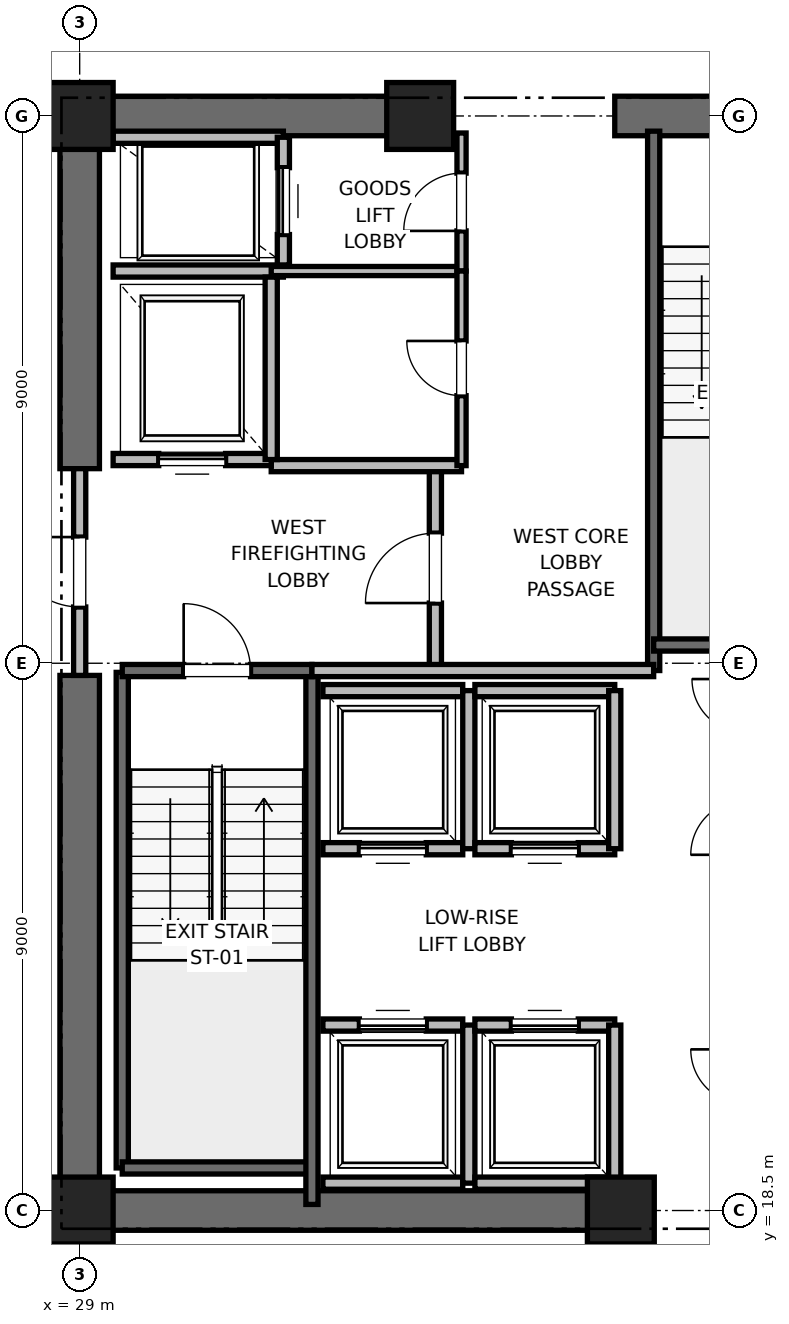
"""IFC4 building model, lengths in metres.
Left out: names, types, materials, properties, quantities, classifications, styles, units other than length and angle.
Written with IfcOpenShell. Run it as: python <this file> out.ifc"""

import sys

from ifc_helpers import new_model, si_unit, direction, frame, frame_2d, origin, origin_2d, place, context, subcontext, project, spatial, rectangle, extrude, element, fill, save


model = new_model("IFC4")
c1 = context("Model", 3, precision=1e-05, world=origin(), true_north=direction((0.0, 1.0)))
c2 = subcontext(c1, "Body", "Model", "MODEL_VIEW")
j1 = project(units=[si_unit("LENGTHUNIT", "METRE"), si_unit("PLANEANGLEUNIT", "RADIAN")], contexts=[c1])
p1 = place(None, origin())
s1 = spatial("IfcSite", under=j1, at=p1, CompositionType="ELEMENT")
p2 = place(p1, origin())
s2 = spatial("IfcBuilding", under=s1, at=p2, CompositionType="ELEMENT")
p3 = place(p2, frame((0.0, 0.0, 95.6)))
s3 = spatial("IfcBuildingStorey", under=s2, at=p3, CompositionType="ELEMENT", Elevation=95.6)
for number, where, z_axis, x_axis in (
    (1, (29.0, 18.5, 0.0), (0.0, 0.0, 1.0), (1.0, 0.0, 0.0)),
    (2, (29.0, 36.5, 0.0), (0.0, 0.0, 1.0), (1.0, 0.0, 0.0)),
    (3, (37.9, 18.5, 0.0), (0.0, 0.0, 1.0), (1.0, 0.0, 0.0)),
    (4, (34.6, 36.5, 0.0), (0.0, 0.0, 1.0), (1.0, 0.0, 0.0)),
):
    element("IfcColumn", number, at=place(p3, frame(where, z_axis=z_axis, x_axis=x_axis)), inside=s3, PredefinedType="PILASTER", context=c2, shape_type="SweptSolid", body=[
        extrude(rectangle(XDim=1.1, YDim=1.1, at=origin_2d()), origin(), (0.0, 0.0, 1.0), 4.0),
    ])
p4 = place(p3, frame((29.0, 18.5, 0.0), z_axis=(0.0, 0.0, 1.0), x_axis=(1.0, 0.0, 0.0)))
e5 = element("IfcWall", 5, at=p4, inside=s3, PredefinedType="SHEAR", context=c2, shape_type="SweptSolid", body=[
    extrude(rectangle(XDim=9.2, YDim=0.65, at=frame_2d((4.6, 0.0))), origin(), (0.0, 0.0, 1.0), 3.76),
])
p5 = place(p3, frame((29.0, 36.5, 0.0), z_axis=(0.0, 0.0, 1.0), x_axis=(1.0, 0.0, 0.0)))
e6 = element("IfcWall", 6, at=p5, inside=s3, PredefinedType="SHEAR", context=c2, shape_type="SweptSolid", body=[
    extrude(rectangle(XDim=5.8, YDim=0.65, at=frame_2d((2.9, 0.0))), origin(), (0.0, 0.0, 1.0), 3.76),
])
p6 = place(p3, frame((37.8, 36.5, 0.0), z_axis=(0.0, 0.0, 1.0), x_axis=(1.0, 0.0, 0.0)))
e7 = element("IfcWall", 7, at=p6, inside=s3, PredefinedType="SHEAR", context=c2, shape_type="SweptSolid", body=[
    extrude(rectangle(XDim=4.4, YDim=0.65, at=frame_2d((2.2, 0.0))), origin(), (0.0, 0.0, 1.0), 3.76),
])
p7 = place(p6, frame((1.65, 0.0, 0.0)))
e8 = element("IfcOpeningElement", 8, at=p7, cuts=e7, PredefinedType="OPENING", context=c2, shape_type="SweptSolid", body=[
    extrude(rectangle(XDim=1.1, YDim=2.15, at=frame_2d((0.55, 1.075))), frame((0.0, 0.325, 0.0), z_axis=(0.0, -1.0, 0.0), x_axis=(1.0, 0.0, 0.0)), (0.0, 0.0, 1.0), 0.65),
])
p8 = place(p3, frame((29.0, 18.5, 0.0), z_axis=(0.0, 0.0, 1.0), x_axis=(0.0, 1.0, 0.0)))
e9 = element("IfcWall", 9, at=p8, inside=s3, PredefinedType="SHEAR", context=c2, shape_type="SweptSolid", body=[
    extrude(rectangle(XDim=8.8, YDim=0.65, at=frame_2d((4.4, 0.0))), origin(), (0.0, 0.0, 1.0), 3.76),
])
p9 = place(p3, frame((29.0, 30.7, 0.0), z_axis=(0.0, 0.0, 1.0), x_axis=(0.0, 1.0, 0.0)))
e10 = element("IfcWall", 10, at=p9, inside=s3, PredefinedType="SHEAR", context=c2, shape_type="SweptSolid", body=[
    extrude(rectangle(XDim=5.8, YDim=0.65, at=frame_2d((2.9, 0.0))), origin(), (0.0, 0.0, 1.0), 3.76),
])
p10 = place(p3, frame((29.7, 19.2, 0.0), z_axis=(0.0, 0.0, 1.0), x_axis=(0.0, 1.0, 0.0)))
e11 = element("IfcWall", 11, at=p10, inside=s3, PredefinedType="SOLIDWALL", context=c2, shape_type="SweptSolid", body=[
    extrude(rectangle(XDim=8.15, YDim=0.2, at=frame_2d((4.075, 0.0))), origin(), (0.0, 0.0, 1.0), 3.76),
])
p11 = place(p3, frame((29.7, 19.2, 0.0), z_axis=(0.0, 0.0, 1.0), x_axis=(1.0, 0.0, 0.0)))
e12 = element("IfcWall", 12, at=p11, inside=s3, PredefinedType="SOLIDWALL", context=c2, shape_type="SweptSolid", body=[
    extrude(rectangle(XDim=3.12, YDim=0.2, at=frame_2d((1.56, 0.0))), origin(), (0.0, 0.0, 1.0), 3.76),
])
p12 = place(p3, frame((32.82, 18.6, 0.0), z_axis=(0.0, 0.0, 1.0), x_axis=(0.0, 1.0, 0.0)))
e13 = element("IfcWall", 13, at=p12, inside=s3, PredefinedType="SOLIDWALL", context=c2, shape_type="SweptSolid", body=[
    extrude(rectangle(XDim=8.78, YDim=0.2, at=frame_2d((4.39, 0.0))), origin(), (0.0, 0.0, 1.0), 3.76),
])
p13 = place(p3, frame((29.7, 27.38, 0.0), z_axis=(0.0, 0.0, 1.0), x_axis=(1.0, 0.0, 0.0)))
e14 = element("IfcWall", 14, at=p13, inside=s3, PredefinedType="SOLIDWALL", context=c2, shape_type="SweptSolid", body=[
    extrude(rectangle(XDim=3.12, YDim=0.2, at=frame_2d((1.56, 0.0))), origin(), (0.0, 0.0, 1.0), 3.76),
])
p14 = place(p13, frame((1.01, 0.0, 0.0)))
e15 = element("IfcOpeningElement", 15, at=p14, cuts=e14, PredefinedType="OPENING", context=c2, shape_type="SweptSolid", body=[
    extrude(rectangle(XDim=1.1, YDim=2.15, at=frame_2d((0.55, 1.075))), frame((0.0, 0.1, 0.0), z_axis=(0.0, -1.0, 0.0), x_axis=(1.0, 0.0, 0.0)), (0.0, 0.0, 1.0), 0.2),
])
p15 = place(p3, frame((38.44, 27.38, 0.0), z_axis=(0.0, 0.0, 1.0), x_axis=(0.0, 1.0, 0.0)))
e16 = element("IfcWall", 16, at=p15, inside=s3, PredefinedType="SOLIDWALL", context=c2, shape_type="SweptSolid", body=[
    extrude(rectangle(XDim=8.87, YDim=0.2, at=frame_2d((4.435, 0.0))), origin(), (0.0, 0.0, 1.0), 3.76),
])
p16 = place(p3, frame((38.44, 27.8, 0.0), z_axis=(0.0, 0.0, 1.0), x_axis=(1.0, 0.0, 0.0)))
e17 = element("IfcWall", 17, at=p16, inside=s3, PredefinedType="SOLIDWALL", context=c2, shape_type="SweptSolid", body=[
    extrude(rectangle(XDim=3.32, YDim=0.2, at=frame_2d((1.66, 0.0))), origin(), (0.0, 0.0, 1.0), 3.76),
])
p17 = place(p3, frame((34.85, 27.38, 0.0), z_axis=(0.0, 0.0, 1.0), x_axis=(0.0, 1.0, 0.0)))
e18 = element("IfcWall", 18, at=p17, inside=s3, PredefinedType="PARTITIONING", context=c2, shape_type="SweptSolid", body=[
    extrude(rectangle(XDim=3.37, YDim=0.2, at=frame_2d((1.685, 0.0))), origin(), (0.0, 0.0, 1.0), 3.76),
])
p18 = place(p17, frame((1.11, 0.0, 0.0)))
e19 = element("IfcOpeningElement", 19, at=p18, cuts=e18, PredefinedType="OPENING", context=c2, shape_type="SweptSolid", body=[
    extrude(rectangle(XDim=1.15, YDim=2.2, at=frame_2d((0.575, 1.1))), frame((0.0, 0.1, 0.0), z_axis=(0.0, -1.0, 0.0), x_axis=(1.0, 0.0, 0.0)), (0.0, 0.0, 1.0), 0.2),
])
p19 = place(p3, frame((29.0, 27.3, 0.0), z_axis=(0.0, 0.0, 1.0), x_axis=(0.0, 1.0, 0.0)))
e20 = element("IfcWall", 20, at=p19, inside=s3, PredefinedType="PARTITIONING", context=c2, shape_type="SweptSolid", body=[
    extrude(rectangle(XDim=3.4, YDim=0.2, at=frame_2d((1.7, 0.0))), origin(), (0.0, 0.0, 1.0), 2.54),
])
p20 = place(p19, frame((1.125, 0.0, 0.0)))
e21 = element("IfcOpeningElement", 21, at=p20, cuts=e20, PredefinedType="OPENING", context=c2, shape_type="SweptSolid", body=[
    extrude(rectangle(XDim=1.15, YDim=2.2, at=frame_2d((0.575, 1.1))), frame((0.0, 0.1, 0.0), z_axis=(0.0, -1.0, 0.0), x_axis=(1.0, 0.0, 0.0)), (0.0, 0.0, 1.0), 0.2),
])
p21 = place(p3, frame((32.82, 27.38, 0.0), z_axis=(0.0, 0.0, 1.0), x_axis=(1.0, 0.0, 0.0)))
e22 = element("IfcWall", 22, at=p21, inside=s3, PredefinedType="PARTITIONING", context=c2, shape_type="SweptSolid", body=[
    extrude(rectangle(XDim=5.62, YDim=0.2, at=frame_2d((2.81, 0.0))), origin(), (0.0, 0.0, 1.0), 3.76),
])
p22 = place(p3, frame((32.15, 30.75, 0.0), z_axis=(0.0, 0.0, 1.0), x_axis=(1.0, 0.0, 0.0)))
e23 = element("IfcWall", 23, at=p22, inside=s3, PredefinedType="PARTITIONING", context=c2, shape_type="SweptSolid", body=[
    extrude(rectangle(XDim=3.13, YDim=0.2, at=frame_2d((1.565, 0.0))), origin(), (0.0, 0.0, 1.0), 3.76),
])
p23 = place(p3, frame((29.55, 30.85, 0.0), z_axis=(0.0, 0.0, 1.0), x_axis=(1.0, 0.0, 0.0)))
e24 = element("IfcWall", 24, at=p23, inside=s3, PredefinedType="SOLIDWALL", context=c2, shape_type="SweptSolid", body=[
    extrude(rectangle(XDim=2.6, YDim=0.2, at=frame_2d((1.3, 0.0))), origin(), (0.0, 0.0, 1.0), 2.54),
])
p24 = place(p23, frame((0.75, 0.0, 0.0)))
e25 = element("IfcOpeningElement", 25, at=p24, cuts=e24, PredefinedType="OPENING", context=c2, shape_type="SweptSolid", body=[
    extrude(rectangle(XDim=1.1, YDim=2.2, at=frame_2d((0.55, 1.1))), frame((0.0, 0.1, 0.0), z_axis=(0.0, -1.0, 0.0), x_axis=(1.0, 0.0, 0.0)), (0.0, 0.0, 1.0), 0.2),
])
p25 = place(p3, frame((29.55, 33.95, 0.0), z_axis=(0.0, 0.0, 1.0), x_axis=(1.0, 0.0, 0.0)))
e26 = element("IfcWall", 26, at=p25, inside=s3, PredefinedType="SOLIDWALL", context=c2, shape_type="SweptSolid", body=[
    extrude(rectangle(XDim=2.8, YDim=0.2, at=frame_2d((1.4, 0.0))), origin(), (0.0, 0.0, 1.0), 3.76),
])
p26 = place(p3, frame((32.15, 30.85, 0.0), z_axis=(0.0, 0.0, 1.0), x_axis=(0.0, 1.0, 0.0)))
e27 = element("IfcWall", 27, at=p26, inside=s3, PredefinedType="SOLIDWALL", context=c2, shape_type="SweptSolid", body=[
    extrude(rectangle(XDim=3.0, YDim=0.2, at=frame_2d((1.5, 0.0))), origin(), (0.0, 0.0, 1.0), 3.76),
])
p27 = place(p3, frame((32.35, 36.15, 0.0), z_axis=(0.0, 0.0, 1.0), x_axis=(-1.0, 0.0, 0.0)))
e28 = element("IfcWall", 28, at=p27, inside=s3, PredefinedType="SOLIDWALL", context=c2, shape_type="SweptSolid", body=[
    extrude(rectangle(XDim=2.8, YDim=0.2, at=frame_2d((1.4, 0.0))), origin(), (0.0, 0.0, 1.0), 2.889),
])
p28 = place(p3, frame((32.35, 34.05, 0.0), z_axis=(0.0, 0.0, 1.0), x_axis=(0.0, 1.0, 0.0)))
e29 = element("IfcWall", 29, at=p28, inside=s3, PredefinedType="SOLIDWALL", context=c2, shape_type="SweptSolid", body=[
    extrude(rectangle(XDim=2.1, YDim=0.2, at=frame_2d((1.05, 0.0))), origin(), (0.0, 0.0, 1.0), 3.76),
])
p29 = place(p28, frame((0.5, 0.0, 0.0)))
e30 = element("IfcOpeningElement", 30, at=p29, cuts=e29, PredefinedType="OPENING", context=c2, shape_type="SweptSolid", body=[
    extrude(rectangle(XDim=1.1, YDim=2.2, at=frame_2d((0.55, 1.1))), frame((0.0, 0.1, 0.0), z_axis=(0.0, -1.0, 0.0), x_axis=(1.0, 0.0, 0.0)), (0.0, 0.0, 1.0), 0.2),
])
p30 = place(p3, frame((33.0, 18.95, 0.0), z_axis=(0.0, 0.0, 1.0), x_axis=(1.0, 0.0, 0.0)))
e31 = element("IfcWall", 31, at=p30, inside=s3, PredefinedType="SOLIDWALL", context=c2, shape_type="SweptSolid", body=[
    extrude(rectangle(XDim=2.3, YDim=0.2, at=frame_2d((1.15, 0.0))), origin(), (0.0, 0.0, 1.0), 3.76),
])
p31 = place(p3, frame((35.3, 21.55, 0.0), z_axis=(0.0, 0.0, 1.0), x_axis=(-1.0, 0.0, 0.0)))
e32 = element("IfcWall", 32, at=p31, inside=s3, PredefinedType="SOLIDWALL", context=c2, shape_type="SweptSolid", body=[
    extrude(rectangle(XDim=2.3, YDim=0.2, at=frame_2d((1.15, 0.0))), origin(), (0.0, 0.0, 1.0), 3.76),
])
p32 = place(p31, frame((0.6, 0.0, 0.0)))
e33 = element("IfcOpeningElement", 33, at=p32, cuts=e32, PredefinedType="OPENING", context=c2, shape_type="SweptSolid", body=[
    extrude(rectangle(XDim=1.1, YDim=2.2, at=frame_2d((0.55, 1.1))), frame((0.0, 0.1, 0.0), z_axis=(0.0, -1.0, 0.0), x_axis=(1.0, 0.0, 0.0)), (0.0, 0.0, 1.0), 0.2),
])
p33 = place(p3, frame((35.4, 18.95, 0.0), z_axis=(0.0, 0.0, 1.0), x_axis=(0.0, 1.0, 0.0)))
e34 = element("IfcWall", 34, at=p33, inside=s3, PredefinedType="SOLIDWALL", context=c2, shape_type="SweptSolid", body=[
    extrude(rectangle(XDim=2.6, YDim=0.2, at=frame_2d((1.3, 0.0))), origin(), (0.0, 0.0, 1.0), 3.76),
])
p34 = place(p3, frame((35.5, 18.95, 0.0), z_axis=(0.0, 0.0, 1.0), x_axis=(1.0, 0.0, 0.0)))
e35 = element("IfcWall", 35, at=p34, inside=s3, PredefinedType="SOLIDWALL", context=c2, shape_type="SweptSolid", body=[
    extrude(rectangle(XDim=2.3, YDim=0.2, at=frame_2d((1.15, 0.0))), origin(), (0.0, 0.0, 1.0), 2.54),
])
p35 = place(p3, frame((37.8, 21.55, 0.0), z_axis=(0.0, 0.0, 1.0), x_axis=(-1.0, 0.0, 0.0)))
e36 = element("IfcWall", 36, at=p35, inside=s3, PredefinedType="SOLIDWALL", context=c2, shape_type="SweptSolid", body=[
    extrude(rectangle(XDim=2.3, YDim=0.2, at=frame_2d((1.15, 0.0))), origin(), (0.0, 0.0, 1.0), 3.76),
])
p36 = place(p35, frame((0.6, 0.0, 0.0)))
e37 = element("IfcOpeningElement", 37, at=p36, cuts=e36, PredefinedType="OPENING", context=c2, shape_type="SweptSolid", body=[
    extrude(rectangle(XDim=1.1, YDim=2.2, at=frame_2d((0.55, 1.1))), frame((0.0, 0.1, 0.0), z_axis=(0.0, -1.0, 0.0), x_axis=(1.0, 0.0, 0.0)), (0.0, 0.0, 1.0), 0.2),
])
p37 = place(p3, frame((37.8, 18.95, 0.0), z_axis=(0.0, 0.0, 1.0), x_axis=(0.0, 1.0, 0.0)))
e38 = element("IfcWall", 38, at=p37, inside=s3, PredefinedType="SOLIDWALL", context=c2, shape_type="SweptSolid", body=[
    extrude(rectangle(XDim=2.6, YDim=0.2, at=frame_2d((1.3, 0.0))), origin(), (0.0, 0.0, 1.0), 2.54),
])
p38 = place(p3, frame((33.0, 24.45, 0.0), z_axis=(0.0, 0.0, 1.0), x_axis=(1.0, 0.0, 0.0)))
e39 = element("IfcWall", 39, at=p38, inside=s3, PredefinedType="SOLIDWALL", context=c2, shape_type="SweptSolid", body=[
    extrude(rectangle(XDim=2.3, YDim=0.2, at=frame_2d((1.15, 0.0))), origin(), (0.0, 0.0, 1.0), 3.76),
])
p39 = place(p38, frame((0.6, 0.0, 0.0)))
e40 = element("IfcOpeningElement", 40, at=p39, cuts=e39, PredefinedType="OPENING", context=c2, shape_type="SweptSolid", body=[
    extrude(rectangle(XDim=1.1, YDim=2.2, at=frame_2d((0.55, 1.1))), frame((0.0, 0.1, 0.0), z_axis=(0.0, -1.0, 0.0), x_axis=(1.0, 0.0, 0.0)), (0.0, 0.0, 1.0), 0.2),
])
p40 = place(p3, frame((35.3, 27.05, 0.0), z_axis=(0.0, 0.0, 1.0), x_axis=(-1.0, 0.0, 0.0)))
e41 = element("IfcWall", 41, at=p40, inside=s3, PredefinedType="SOLIDWALL", context=c2, shape_type="SweptSolid", body=[
    extrude(rectangle(XDim=2.3, YDim=0.2, at=frame_2d((1.15, 0.0))), origin(), (0.0, 0.0, 1.0), 3.76),
])
p41 = place(p3, frame((35.4, 24.45, 0.0), z_axis=(0.0, 0.0, 1.0), x_axis=(0.0, 1.0, 0.0)))
e42 = element("IfcWall", 42, at=p41, inside=s3, PredefinedType="SOLIDWALL", context=c2, shape_type="SweptSolid", body=[
    extrude(rectangle(XDim=2.6, YDim=0.2, at=frame_2d((1.3, 0.0))), origin(), (0.0, 0.0, 1.0), 3.76),
])
p42 = place(p3, frame((35.5, 24.45, 0.0), z_axis=(0.0, 0.0, 1.0), x_axis=(1.0, 0.0, 0.0)))
e43 = element("IfcWall", 43, at=p42, inside=s3, PredefinedType="SOLIDWALL", context=c2, shape_type="SweptSolid", body=[
    extrude(rectangle(XDim=2.3, YDim=0.2, at=frame_2d((1.15, 0.0))), origin(), (0.0, 0.0, 1.0), 3.76),
])
p43 = place(p42, frame((0.6, 0.0, 0.0)))
e44 = element("IfcOpeningElement", 44, at=p43, cuts=e43, PredefinedType="OPENING", context=c2, shape_type="SweptSolid", body=[
    extrude(rectangle(XDim=1.1, YDim=2.2, at=frame_2d((0.55, 1.1))), frame((0.0, 0.1, 0.0), z_axis=(0.0, -1.0, 0.0), x_axis=(1.0, 0.0, 0.0)), (0.0, 0.0, 1.0), 0.2),
])
p44 = place(p3, frame((37.8, 27.05, 0.0), z_axis=(0.0, 0.0, 1.0), x_axis=(-1.0, 0.0, 0.0)))
e45 = element("IfcWall", 45, at=p44, inside=s3, PredefinedType="SOLIDWALL", context=c2, shape_type="SweptSolid", body=[
    extrude(rectangle(XDim=2.3, YDim=0.2, at=frame_2d((1.15, 0.0))), origin(), (0.0, 0.0, 1.0), 3.76),
])
p45 = place(p3, frame((37.8, 24.45, 0.0), z_axis=(0.0, 0.0, 1.0), x_axis=(0.0, 1.0, 0.0)))
e46 = element("IfcWall", 46, at=p45, inside=s3, PredefinedType="SOLIDWALL", context=c2, shape_type="SweptSolid", body=[
    extrude(rectangle(XDim=2.6, YDim=0.2, at=frame_2d((1.3, 0.0))), origin(), (0.0, 0.0, 1.0), 3.76),
])
p46 = place(p3, frame((32.15, 33.95, 0.0), z_axis=(0.0, 0.0, 1.0), x_axis=(1.0, 0.0, 0.0)))
e47 = element("IfcWall", 47, at=p46, inside=s3, PredefinedType="PARTITIONING", context=c2, shape_type="SweptSolid", body=[
    extrude(rectangle(XDim=3.13, YDim=0.15, at=frame_2d((1.565, 0.0))), origin(), (0.0, 0.0, 1.0), 2.85),
])
p47 = place(p3, frame((35.28, 33.95, 0.0), z_axis=(0.0, 0.0, 1.0), x_axis=(0.0, 1.0, 0.0)))
e48 = element("IfcWall", 48, at=p47, inside=s3, PredefinedType="PARTITIONING", context=c2, shape_type="SweptSolid", body=[
    extrude(rectangle(XDim=2.27, YDim=0.15, at=frame_2d((1.135, 0.0))), origin(), (0.0, 0.0, 1.0), 2.54),
])
p48 = place(p47, frame((0.66, 0.0, 0.0)))
e49 = element("IfcOpeningElement", 49, at=p48, cuts=e48, PredefinedType="OPENING", context=c2, shape_type="SweptSolid", body=[
    extrude(rectangle(XDim=0.95, YDim=2.15, at=frame_2d((0.475, 1.075))), frame((0.0, 0.075, 0.0), z_axis=(0.0, -1.0, 0.0), x_axis=(1.0, 0.0, 0.0)), (0.0, 0.0, 1.0), 0.15),
])
p49 = place(p3, frame((35.28, 30.75, 0.0), z_axis=(0.0, 0.0, 1.0), x_axis=(0.0, 1.0, 0.0)))
e50 = element("IfcWall", 50, at=p49, inside=s3, PredefinedType="PARTITIONING", context=c2, shape_type="SweptSolid", body=[
    extrude(rectangle(XDim=3.2, YDim=0.15, at=frame_2d((1.6, 0.0))), origin(), (0.0, 0.0, 1.0), 2.85),
])
p50 = place(p49, frame((1.15, 0.0, 0.0)))
e51 = element("IfcOpeningElement", 51, at=p50, cuts=e50, PredefinedType="OPENING", context=c2, shape_type="SweptSolid", body=[
    extrude(rectangle(XDim=0.9, YDim=2.1, at=frame_2d((0.45, 1.05))), frame((0.0, 0.075, 0.0), z_axis=(0.0, -1.0, 0.0), x_axis=(1.0, 0.0, 0.0)), (0.0, 0.0, 1.0), 0.15),
])
p51 = place(p14, origin())
e52 = element("IfcDoor", 52, at=p51, inside=s3, OperationType="SINGLE_SWING_LEFT", PredefinedType="DOOR", context=c2, shape_type="SweptSolid", body=[
    extrude(rectangle(XDim=1.1, YDim=2.15, at=frame_2d((0.55, 1.075))), frame((0.0, 0.025, 0.0), z_axis=(0.0, -1.0, 0.0), x_axis=(1.0, 0.0, 0.0)), (0.0, 0.0, 1.0), 0.05),
])
fill(e15, e52)
p52 = place(p18, origin())
e53 = element("IfcDoor", 53, at=p52, inside=s3, OperationType="SINGLE_SWING_LEFT", PredefinedType="DOOR", context=c2, shape_type="SweptSolid", body=[
    extrude(rectangle(XDim=1.15, YDim=2.2, at=frame_2d((0.575, 1.1))), frame((0.0, 0.025, 0.0), z_axis=(0.0, -1.0, 0.0), x_axis=(1.0, 0.0, 0.0)), (0.0, 0.0, 1.0), 0.05),
])
fill(e19, e53)
p53 = place(p20, origin())
e54 = element("IfcDoor", 54, at=p53, inside=s3, OperationType="SINGLE_SWING_RIGHT", PredefinedType="DOOR", context=c2, shape_type="SweptSolid", body=[
    extrude(rectangle(XDim=1.15, YDim=2.2, at=frame_2d((0.575, 1.1))), frame((0.0, 0.025, 0.0), z_axis=(0.0, -1.0, 0.0), x_axis=(1.0, 0.0, 0.0)), (0.0, 0.0, 1.0), 0.05),
])
fill(e21, e54)
p54 = place(p24, origin())
e55 = element("IfcDoor", 55, at=p54, inside=s3, OperationType="SLIDING_TO_RIGHT", PredefinedType="DOOR", context=c2, shape_type="SweptSolid", body=[
    extrude(rectangle(XDim=1.1, YDim=2.2, at=frame_2d((0.55, 1.1))), frame((0.0, 0.025, 0.0), z_axis=(0.0, -1.0, 0.0), x_axis=(1.0, 0.0, 0.0)), (0.0, 0.0, 1.0), 0.05),
])
fill(e25, e55)
p55 = place(p29, origin())
e56 = element("IfcDoor", 56, at=p55, inside=s3, OperationType="SLIDING_TO_RIGHT", PredefinedType="DOOR", context=c2, shape_type="SweptSolid", body=[
    extrude(rectangle(XDim=1.1, YDim=2.2, at=frame_2d((0.55, 1.1))), frame((0.0, 0.025, 0.0), z_axis=(0.0, -1.0, 0.0), x_axis=(1.0, 0.0, 0.0)), (0.0, 0.0, 1.0), 0.05),
])
fill(e30, e56)
p56 = place(p32, origin())
e57 = element("IfcDoor", 57, at=p56, inside=s3, OperationType="SLIDING_TO_RIGHT", PredefinedType="DOOR", context=c2, shape_type="SweptSolid", body=[
    extrude(rectangle(XDim=1.1, YDim=2.2, at=frame_2d((0.55, 1.1))), frame((0.0, 0.025, 0.0), z_axis=(0.0, -1.0, 0.0), x_axis=(1.0, 0.0, 0.0)), (0.0, 0.0, 1.0), 0.05),
])
fill(e33, e57)
p57 = place(p36, origin())
e58 = element("IfcDoor", 58, at=p57, inside=s3, OperationType="SLIDING_TO_RIGHT", PredefinedType="DOOR", context=c2, shape_type="SweptSolid", body=[
    extrude(rectangle(XDim=1.1, YDim=2.2, at=frame_2d((0.55, 1.1))), frame((0.0, 0.025, 0.0), z_axis=(0.0, -1.0, 0.0), x_axis=(1.0, 0.0, 0.0)), (0.0, 0.0, 1.0), 0.05),
])
fill(e37, e58)
p58 = place(p39, origin())
e59 = element("IfcDoor", 59, at=p58, inside=s3, OperationType="SLIDING_TO_RIGHT", PredefinedType="DOOR", context=c2, shape_type="SweptSolid", body=[
    extrude(rectangle(XDim=1.1, YDim=2.2, at=frame_2d((0.55, 1.1))), frame((0.0, 0.025, 0.0), z_axis=(0.0, -1.0, 0.0), x_axis=(1.0, 0.0, 0.0)), (0.0, 0.0, 1.0), 0.05),
])
fill(e40, e59)
p59 = place(p43, origin())
e60 = element("IfcDoor", 60, at=p59, inside=s3, OperationType="SLIDING_TO_RIGHT", PredefinedType="DOOR", context=c2, shape_type="SweptSolid", body=[
    extrude(rectangle(XDim=1.1, YDim=2.2, at=frame_2d((0.55, 1.1))), frame((0.0, 0.025, 0.0), z_axis=(0.0, -1.0, 0.0), x_axis=(1.0, 0.0, 0.0)), (0.0, 0.0, 1.0), 0.05),
])
fill(e44, e60)
p60 = place(p48, origin())
e61 = element("IfcDoor", 61, at=p60, inside=s3, OperationType="SINGLE_SWING_LEFT", PredefinedType="DOOR", context=c2, shape_type="SweptSolid", body=[
    extrude(rectangle(XDim=0.95, YDim=2.15, at=frame_2d((0.475, 1.075))), frame((0.0, 0.025, 0.0), z_axis=(0.0, -1.0, 0.0), x_axis=(1.0, 0.0, 0.0)), (0.0, 0.0, 1.0), 0.05),
])
fill(e49, e61)
p61 = place(p50, origin())
e62 = element("IfcDoor", 62, at=p61, inside=s3, OperationType="SINGLE_SWING_RIGHT", PredefinedType="DOOR", context=c2, shape_type="SweptSolid", body=[
    extrude(rectangle(XDim=0.9, YDim=2.1, at=frame_2d((0.45, 1.05))), frame((0.0, 0.025, 0.0), z_axis=(0.0, -1.0, 0.0), x_axis=(1.0, 0.0, 0.0)), (0.0, 0.0, 1.0), 0.05),
])
fill(e51, e62)
save(model, sys.argv[1])
